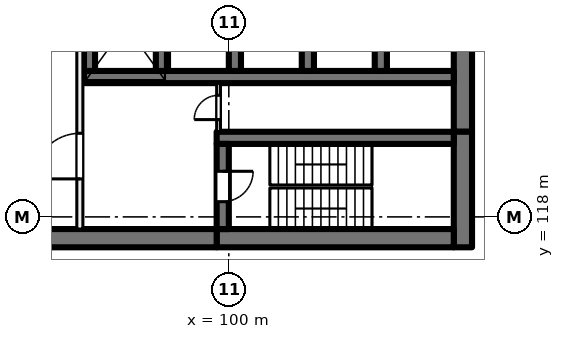
"""IFC4 building model, lengths in metres.
Left out: names, types, materials, properties, quantities, classifications, styles, units other than length and angle.
Written with IfcOpenShell. Run it as: python <this file> out.ifc"""

import sys

from ifc_helpers import new_model, si_unit, direction, frame, frame_2d, origin, place, context, subcontext, project, spatial, rectangle, extrude, element, fill, save


model = new_model("IFC4")
c1 = context("Model", 3, precision=1e-05, world=origin(), true_north=direction((0.0, 1.0)))
c2 = subcontext(c1, "Body", "Model", "MODEL_VIEW")
j1 = project(units=[si_unit("LENGTHUNIT", "METRE"), si_unit("PLANEANGLEUNIT", "RADIAN")], contexts=[c1])
p1 = place(None, origin())
s1 = spatial("IfcSite", under=j1, at=p1, CompositionType="ELEMENT")
p2 = place(p1, origin())
s2 = spatial("IfcBuilding", under=s1, at=p2, CompositionType="ELEMENT")
p3 = place(p2, frame((0.0, 0.0, -9.0)))
s3 = spatial("IfcBuildingStorey", under=s2, at=p3, CompositionType="ELEMENT", Elevation=-9.0)
p4 = place(p3, frame((107.7, 135.2, 0.0), z_axis=(0.0, 0.0, 1.0), x_axis=(0.0, -1.0, 0.0)))
e1 = element("IfcWall", 1, at=p4, inside=s3, PredefinedType="SHEAR", context=c2, shape_type="SweptSolid", body=[
    extrude(rectangle(XDim=14.4, YDim=0.6, at=frame_2d((7.2, 0.0))), origin(), (0.0, 0.0, 1.0), 4.5),
])
p5 = place(p3, frame((107.7, 120.8, 0.0), z_axis=(0.0, 0.0, 1.0), x_axis=(0.0, -1.0, 0.0)))
e2 = element("IfcWall", 2, at=p5, inside=s3, PredefinedType="SHEAR", context=c2, shape_type="SweptSolid", body=[
    extrude(rectangle(XDim=3.8, YDim=0.6, at=frame_2d((1.9, 0.0))), origin(), (0.0, 0.0, 1.0), 4.5),
])
p6 = place(p3, frame((107.4, 117.3, 0.0), z_axis=(0.0, 0.0, 1.0), x_axis=(-1.0, 0.0, 0.0)))
e3 = element("IfcWall", 3, at=p6, inside=s3, PredefinedType="SHEAR", context=c2, shape_type="SweptSolid", body=[
    extrude(rectangle(XDim=7.8, YDim=0.6, at=frame_2d((3.9, 0.0))), origin(), (0.0, 0.0, 1.0), 4.5),
])
p7 = place(p3, frame((99.6, 117.3, 0.0), z_axis=(0.0, 0.0, 1.0), x_axis=(-1.0, 0.0, 0.0)))
e4 = element("IfcWall", 4, at=p7, inside=s3, PredefinedType="SHEAR", context=c2, shape_type="SweptSolid", body=[
    extrude(rectangle(XDim=8.9, YDim=0.6, at=frame_2d((4.45, 0.0))), origin(), (0.0, 0.0, 1.0), 4.5),
])
p8 = place(p3, frame((107.4, 120.6, 0.0), z_axis=(0.0, 0.0, 1.0), x_axis=(-1.0, 0.0, 0.0)))
e5 = element("IfcWall", 5, at=p8, inside=s3, PredefinedType="SHEAR", context=c2, shape_type="SweptSolid", body=[
    extrude(rectangle(XDim=7.8, YDim=0.4, at=frame_2d((3.9, 0.0))), origin(), (0.0, 0.0, 1.0), 4.5),
])
p9 = place(p3, frame((99.8, 120.4, 0.0), z_axis=(0.0, 0.0, 1.0), x_axis=(0.0, -1.0, 0.0)))
e6 = element("IfcWall", 6, at=p9, inside=s3, PredefinedType="SHEAR", context=c2, shape_type="SweptSolid", body=[
    extrude(rectangle(XDim=2.8, YDim=0.4, at=frame_2d((1.4, 0.0))), origin(), (0.0, 0.0, 1.0), 4.5),
])
p10 = place(p9, frame((0.9, 0.0, 0.0)))
e7 = element("IfcOpeningElement", 7, at=p10, cuts=e6, PredefinedType="OPENING", context=c2, shape_type="SweptSolid", body=[
    extrude(rectangle(XDim=1.0, YDim=2.1, at=frame_2d((0.5, 1.05))), frame((0.0, 0.21, 0.0), z_axis=(0.0, -1.0, 0.0), x_axis=(1.0, 0.0, 0.0)), (0.0, 0.0, 1.0), 0.42),
])
p11 = place(p3, frame((107.4, 122.6, 0.0), z_axis=(0.0, 0.0, 1.0), x_axis=(-1.0, 0.0, 0.0)))
e8 = element("IfcWall", 8, at=p11, inside=s3, PredefinedType="SHEAR", context=c2, shape_type="SweptSolid", body=[
    extrude(rectangle(XDim=12.2, YDim=0.4, at=frame_2d((6.1, 0.0))), origin(), (0.0, 0.0, 1.0), 4.5),
])
for number, where, z_axis, x_axis in (
    (9, (105.0, 125.8, 0.0), (0.0, 0.0, 1.0), (0.0, -1.0, 0.0)),
    (10, (102.6, 125.8, 0.0), (0.0, 0.0, 1.0), (0.0, -1.0, 0.0)),
    (11, (100.2, 125.8, 0.0), (0.0, 0.0, 1.0), (0.0, -1.0, 0.0)),
    (12, (97.8, 125.8, 0.0), (0.0, 0.0, 1.0), (0.0, -1.0, 0.0)),
    (13, (95.4, 125.8, 0.0), (0.0, 0.0, 1.0), (0.0, -1.0, 0.0)),
):
    element("IfcWall", number, at=place(p3, frame(where, z_axis=z_axis, x_axis=x_axis)), inside=s3, PredefinedType="SHEAR", context=c2, shape_type="SweptSolid", body=[
        extrude(rectangle(XDim=3.0, YDim=0.4, at=frame_2d((1.5, 0.0))), origin(), (0.0, 0.0, 1.0), 4.5),
    ])
p12 = place(p3, frame((95.1, 117.6, 0.0), z_axis=(0.0, 0.0, 1.0), x_axis=(0.0, 1.0, 0.0)))
e14 = element("IfcWall", 14, at=p12, inside=s3, PredefinedType="PARTITIONING", context=c2, shape_type="SweptSolid", body=[
    extrude(rectangle(XDim=8.4, YDim=0.2, at=frame_2d((4.2, 0.0))), origin(), (0.0, 0.0, 1.0), 4.125),
])
p13 = place(p12, frame((1.65, 0.0, 0.0)))
e15 = element("IfcOpeningElement", 15, at=p13, cuts=e14, PredefinedType="OPENING", context=c2, shape_type="SweptSolid", body=[
    extrude(rectangle(XDim=1.5, YDim=2.1, at=frame_2d((0.75, 1.05))), frame((0.0, 0.11, 0.0), z_axis=(0.0, -1.0, 0.0), x_axis=(1.0, 0.0, 0.0)), (0.0, 0.0, 1.0), 0.22),
])
p14 = place(p3, frame((99.663, 120.8, 0.0), z_axis=(0.0, 0.0, 1.0), x_axis=(0.0, 1.0, 0.0)))
e16 = element("IfcWall", 16, at=p14, inside=s3, PredefinedType="PARTITIONING", context=c2, shape_type="SweptSolid", body=[
    extrude(rectangle(XDim=1.6, YDim=0.125, at=frame_2d((0.8, 0.0))), origin(), (0.0, 0.0, 1.0), 4.125),
])
p15 = place(p14, frame((0.4, 0.0, 0.0)))
e17 = element("IfcOpeningElement", 17, at=p15, cuts=e16, PredefinedType="OPENING", context=c2, shape_type="SweptSolid", body=[
    extrude(rectangle(XDim=0.8, YDim=2.1, at=frame_2d((0.4, 1.05))), frame((0.0, 0.073, 0.0), z_axis=(0.0, -1.0, 0.0), x_axis=(1.0, 0.0, 0.0)), (0.0, 0.0, 1.0), 0.145),
])
p16 = place(p13, origin())
e18 = element("IfcDoor", 18, at=p16, inside=s3, OperationType="DOUBLE_DOOR_SINGLE_SWING", PredefinedType="DOOR", context=c2, shape_type="SweptSolid", body=[
    extrude(rectangle(XDim=1.5, YDim=2.1, at=frame_2d((0.75, 1.05))), frame((0.0, 0.025, 0.0), z_axis=(0.0, -1.0, 0.0), x_axis=(1.0, 0.0, 0.0)), (0.0, 0.0, 1.0), 0.05),
])
fill(e15, e18)
p17 = place(p10, origin())
e19 = element("IfcDoor", 19, at=p17, inside=s3, OperationType="SINGLE_SWING_LEFT", PredefinedType="DOOR", context=c2, shape_type="SweptSolid", body=[
    extrude(rectangle(XDim=1.0, YDim=2.1, at=frame_2d((0.5, 1.05))), frame((0.0, 0.025, 0.0), z_axis=(0.0, -1.0, 0.0), x_axis=(1.0, 0.0, 0.0)), (0.0, 0.0, 1.0), 0.05),
])
fill(e7, e19)
p18 = place(p15, origin())
e20 = element("IfcDoor", 20, at=p18, inside=s3, OperationType="SINGLE_SWING_RIGHT", PredefinedType="DOOR", context=c2, shape_type="SweptSolid", body=[
    extrude(rectangle(XDim=0.8, YDim=2.1, at=frame_2d((0.4, 1.05))), frame((0.0, 0.025, 0.0), z_axis=(0.0, -1.0, 0.0), x_axis=(1.0, 0.0, 0.0)), (0.0, 0.0, 1.0), 0.05),
])
fill(e17, e20)
save(model, sys.argv[1])
